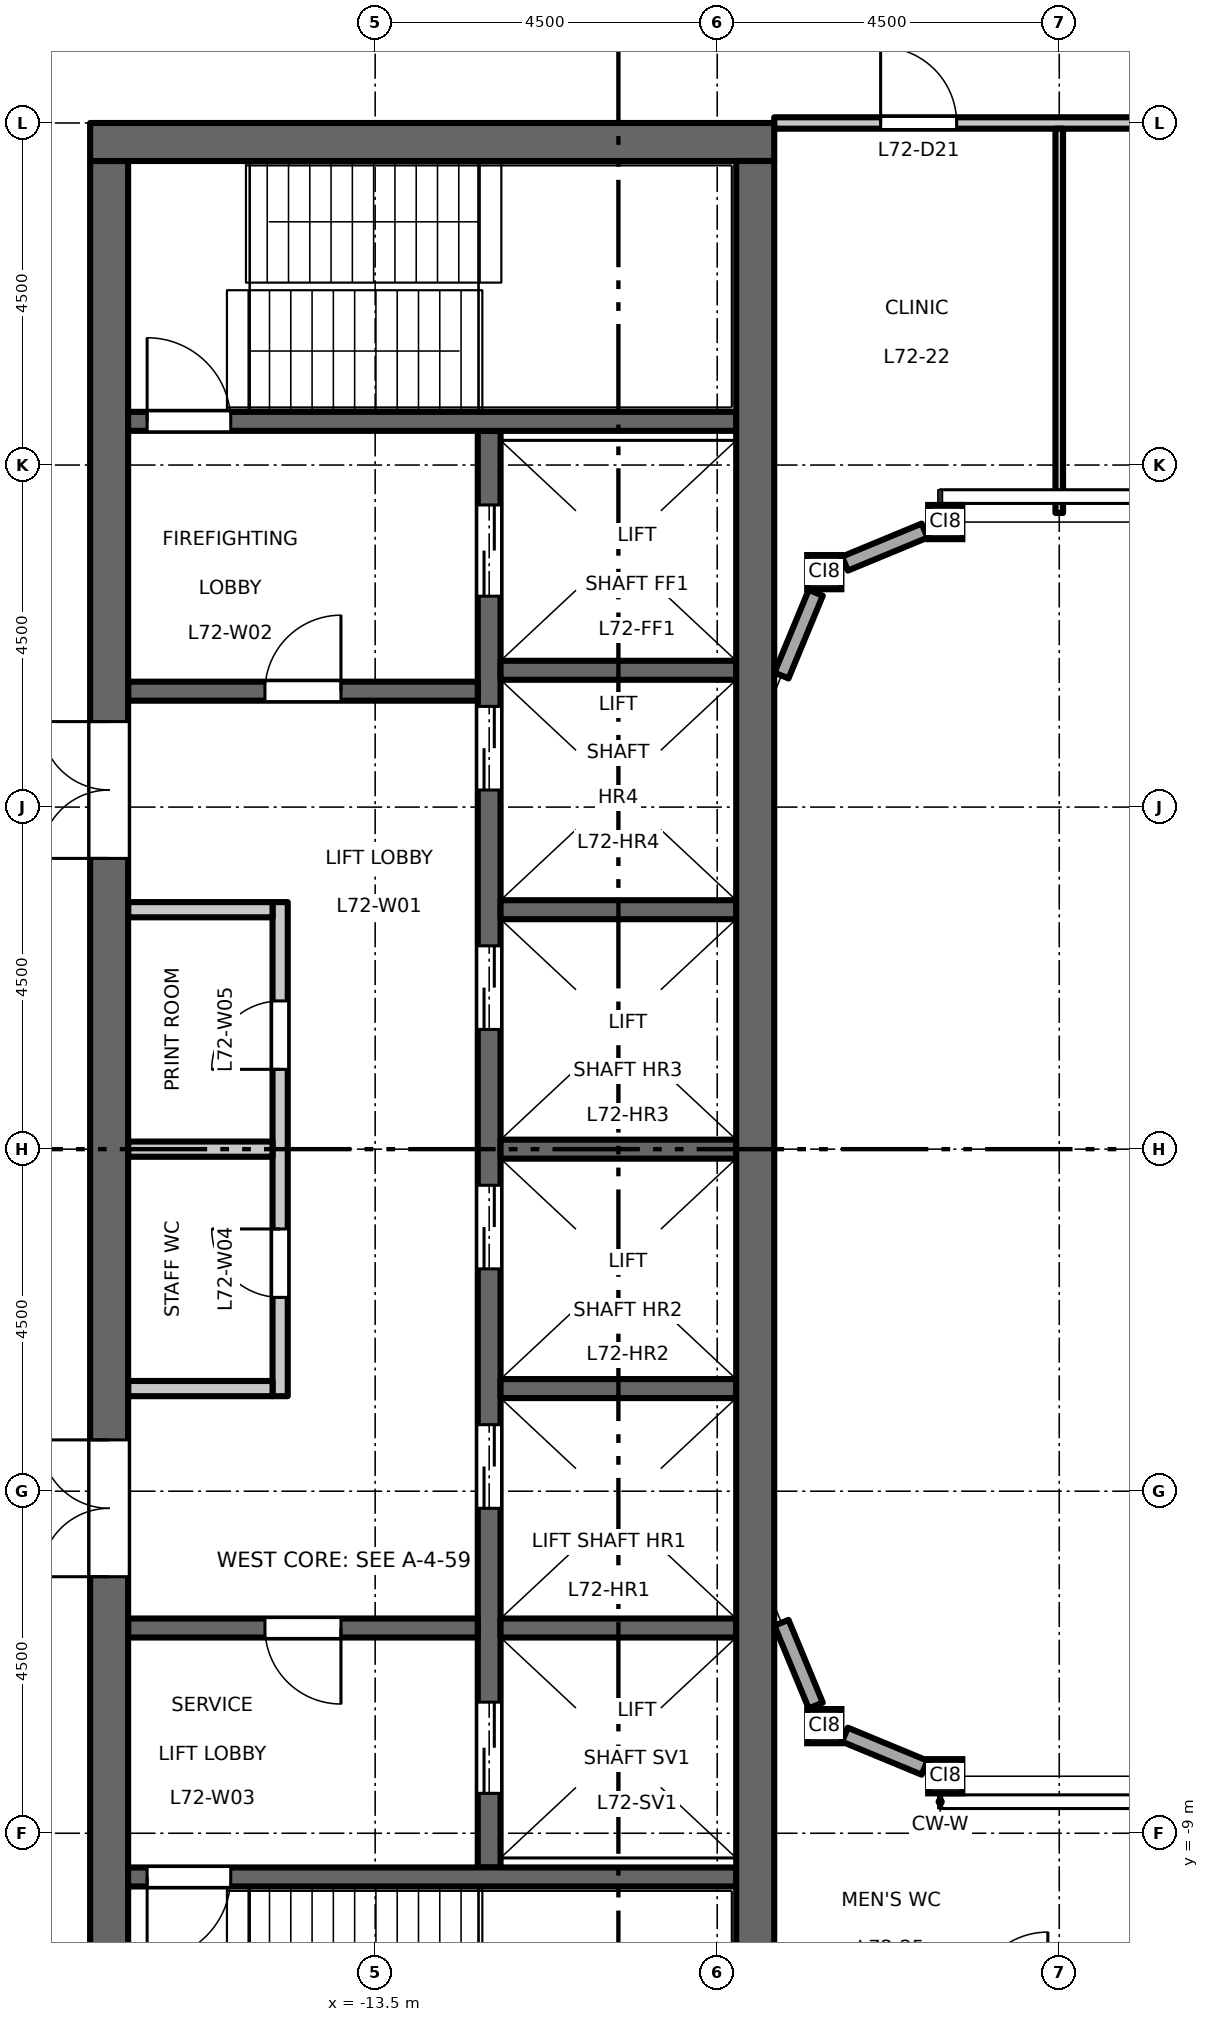
"""IFC4 building model, lengths in metres.
Left out: names, types, materials, properties, quantities, classifications, styles, units other than length and angle.
Written with IfcOpenShell. Run it as: python <this file> out.ifc"""

import sys

from ifc_helpers import new_model, si_unit, direction, frame, frame_2d, origin, origin_2d, place, context, subcontext, project, spatial, rectangle, hollow_rectangle, extrude, element, fill, save


model = new_model("IFC4")
c1 = context("Model", 3, precision=1e-05, world=origin(), true_north=direction((0.0, 1.0)))
c2 = subcontext(c1, "Body", "Model", "MODEL_VIEW")
j1 = project(units=[si_unit("LENGTHUNIT", "METRE"), si_unit("PLANEANGLEUNIT", "RADIAN")], contexts=[c1])
p1 = place(None, origin())
s1 = spatial("IfcSite", under=j1, at=p1, CompositionType="ELEMENT")
p2 = place(p1, origin())
s2 = spatial("IfcBuilding", under=s1, at=p2, CompositionType="ELEMENT")
p3 = place(p2, frame((0.0, 0.0, 334.7)))
s3 = spatial("IfcBuildingStorey", under=s2, at=p3, CompositionType="ELEMENT", Elevation=334.7)
for number, where, z_axis, x_axis in (
    (1, (-7.591, -7.591, 0.0), (0.0, 0.0, 1.0), (1.0, 0.0, 0.0)),
    (2, (-6.0, -8.25, 0.0), (0.0, 0.0, 1.0), (1.0, 0.0, 0.0)),
    (3, (-7.591, 7.591, 0.0), (0.0, 0.0, 1.0), (1.0, 0.0, 0.0)),
    (4, (-6.0, 8.25, 0.0), (0.0, 0.0, 1.0), (1.0, 0.0, 0.0)),
):
    element("IfcColumn", number, at=place(p3, frame(where, z_axis=z_axis, x_axis=x_axis)), inside=s3, PredefinedType="COLUMN", context=c2, shape_type="SweptSolid", body=[
        extrude(hollow_rectangle(XDim=0.45, YDim=0.45, WallThickness=0.022, at=origin_2d()), origin(), (0.0, 0.0, 1.0), 4.5),
    ])
p4 = place(p3, frame((-14.75, -3.25, 0.0), z_axis=(0.0, 0.0, 1.0), x_axis=(0.0, 1.0, 0.0)))
e5 = element("IfcWall", 5, at=p4, inside=s3, PredefinedType="PARTITIONING", context=c2, shape_type="SweptSolid", body=[
    extrude(rectangle(XDim=6.5, YDim=0.2, at=frame_2d((3.25, 0.0))), origin(), (0.0, 0.0, 1.0), 4.35),
])
p5 = place(p4, frame((1.3, 0.0, 0.0)))
e6 = element("IfcOpeningElement", 6, at=p5, cuts=e5, PredefinedType="OPENING", context=c2, shape_type="SweptSolid", body=[
    extrude(rectangle(XDim=0.9, YDim=2.1, at=frame_2d((0.45, 1.05))), frame((0.0, 0.11, 0.0), z_axis=(0.0, -1.0, 0.0), x_axis=(1.0, 0.0, 0.0)), (0.0, 0.0, 1.0), 0.22),
])
p6 = place(p4, frame((4.3, 0.0, 0.0)))
e7 = element("IfcOpeningElement", 7, at=p6, cuts=e5, PredefinedType="OPENING", context=c2, shape_type="SweptSolid", body=[
    extrude(rectangle(XDim=0.9, YDim=2.1, at=frame_2d((0.45, 1.05))), frame((0.0, 0.11, 0.0), z_axis=(0.0, -1.0, 0.0), x_axis=(1.0, 0.0, 0.0)), (0.0, 0.0, 1.0), 0.22),
])
for number, where, z_axis, x_axis in (
    (8, (-14.85, 3.15, 0.0), (0.0, 0.0, 1.0), (-1.0, 0.0, 0.0)),
    (9, (-14.85, -3.15, 0.0), (0.0, 0.0, 1.0), (-1.0, 0.0, 0.0)),
    (10, (-14.85, 0.0, 0.0), (0.0, 0.0, 1.0), (-1.0, 0.0, 0.0)),
):
    element("IfcWall", number, at=place(p3, frame(where, z_axis=z_axis, x_axis=x_axis)), inside=s3, PredefinedType="PARTITIONING", context=c2, shape_type="SweptSolid", body=[
        extrude(rectangle(XDim=1.9, YDim=0.2, at=frame_2d((0.95, 0.0))), origin(), (0.0, 0.0, 1.0), 4.35),
    ])
p7 = place(p3, frame((-12.0, -9.45, 0.0), z_axis=(0.0, 0.0, 1.0), x_axis=(0.0, 1.0, 0.0)))
e11 = element("IfcWall", 11, at=p7, inside=s3, PredefinedType="SHEAR", context=c2, shape_type="SweptSolid", body=[
    extrude(rectangle(XDim=18.9, YDim=0.3, at=frame_2d((9.45, 0.0))), origin(), (0.0, 0.0, 1.0), 4.35),
])
p8 = place(p7, frame((4.725, 0.0, 0.0)))
e12 = element("IfcOpeningElement", 12, at=p8, cuts=e11, PredefinedType="OPENING", context=c2, shape_type="SweptSolid", body=[
    extrude(rectangle(XDim=1.1, YDim=2.1, at=frame_2d((0.55, 1.05))), frame((0.0, 0.16, 0.0), z_axis=(0.0, -1.0, 0.0), x_axis=(1.0, 0.0, 0.0)), (0.0, 0.0, 1.0), 0.32),
])
p9 = place(p7, frame((7.875, 0.0, 0.0)))
e13 = element("IfcOpeningElement", 13, at=p9, cuts=e11, PredefinedType="OPENING", context=c2, shape_type="SweptSolid", body=[
    extrude(rectangle(XDim=1.1, YDim=2.1, at=frame_2d((0.55, 1.05))), frame((0.0, 0.16, 0.0), z_axis=(0.0, -1.0, 0.0), x_axis=(1.0, 0.0, 0.0)), (0.0, 0.0, 1.0), 0.32),
])
p10 = place(p7, frame((11.025, 0.0, 0.0)))
e14 = element("IfcOpeningElement", 14, at=p10, cuts=e11, PredefinedType="OPENING", context=c2, shape_type="SweptSolid", body=[
    extrude(rectangle(XDim=1.1, YDim=2.1, at=frame_2d((0.55, 1.05))), frame((0.0, 0.16, 0.0), z_axis=(0.0, -1.0, 0.0), x_axis=(1.0, 0.0, 0.0)), (0.0, 0.0, 1.0), 0.32),
])
p11 = place(p7, frame((14.175, 0.0, 0.0)))
e15 = element("IfcOpeningElement", 15, at=p11, cuts=e11, PredefinedType="OPENING", context=c2, shape_type="SweptSolid", body=[
    extrude(rectangle(XDim=1.1, YDim=2.1, at=frame_2d((0.55, 1.05))), frame((0.0, 0.16, 0.0), z_axis=(0.0, -1.0, 0.0), x_axis=(1.0, 0.0, 0.0)), (0.0, 0.0, 1.0), 0.32),
])
p12 = place(p7, frame((16.725, 0.0, 0.0)))
e16 = element("IfcOpeningElement", 16, at=p12, cuts=e11, PredefinedType="OPENING", context=c2, shape_type="SweptSolid", body=[
    extrude(rectangle(XDim=1.2, YDim=2.1, at=frame_2d((0.6, 1.05))), frame((0.0, 0.16, 0.0), z_axis=(0.0, -1.0, 0.0), x_axis=(1.0, 0.0, 0.0)), (0.0, 0.0, 1.0), 0.32),
])
p13 = place(p7, frame((0.975, 0.0, 0.0)))
e17 = element("IfcOpeningElement", 17, at=p13, cuts=e11, PredefinedType="OPENING", context=c2, shape_type="SweptSolid", body=[
    extrude(rectangle(XDim=1.2, YDim=2.1, at=frame_2d((0.6, 1.05))), frame((0.0, 0.16, 0.0), z_axis=(0.0, -1.0, 0.0), x_axis=(1.0, 0.0, 0.0)), (0.0, 0.0, 1.0), 0.32),
])
p14 = place(p3, frame((-12.15, 6.025, 0.0), z_axis=(0.0, 0.0, 1.0), x_axis=(-1.0, 0.0, 0.0)))
e18 = element("IfcWall", 18, at=p14, inside=s3, PredefinedType="SHEAR", context=c2, shape_type="SweptSolid", body=[
    extrude(rectangle(XDim=4.6, YDim=0.25, at=frame_2d((2.3, 0.0))), origin(), (0.0, 0.0, 1.0), 4.35),
])
p15 = place(p14, frame((1.8, 0.0, 0.0)))
e19 = element("IfcOpeningElement", 19, at=p15, cuts=e18, PredefinedType="OPENING", context=c2, shape_type="SweptSolid", body=[
    extrude(rectangle(XDim=1.0, YDim=2.1, at=frame_2d((0.5, 1.05))), frame((0.0, 0.135, 0.0), z_axis=(0.0, -1.0, 0.0), x_axis=(1.0, 0.0, 0.0)), (0.0, 0.0, 1.0), 0.27),
])
p16 = place(p3, frame((-12.15, -6.3, 0.0), z_axis=(0.0, 0.0, 1.0), x_axis=(-1.0, 0.0, 0.0)))
e20 = element("IfcWall", 20, at=p16, inside=s3, PredefinedType="SHEAR", context=c2, shape_type="SweptSolid", body=[
    extrude(rectangle(XDim=4.6, YDim=0.25, at=frame_2d((2.3, 0.0))), origin(), (0.0, 0.0, 1.0), 4.35),
])
p17 = place(p16, frame((1.8, 0.0, 0.0)))
e21 = element("IfcOpeningElement", 21, at=p17, cuts=e20, PredefinedType="OPENING", context=c2, shape_type="SweptSolid", body=[
    extrude(rectangle(XDim=1.0, YDim=2.1, at=frame_2d((0.5, 1.05))), frame((0.0, 0.135, 0.0), z_axis=(0.0, -1.0, 0.0), x_axis=(1.0, 0.0, 0.0)), (0.0, 0.0, 1.0), 0.27),
])
p18 = place(p3, frame((-17.0, -13.0, 0.0), z_axis=(0.0, 0.0, 1.0), x_axis=(0.0, 1.0, 0.0)))
e22 = element("IfcWall", 22, at=p18, inside=s3, PredefinedType="SHEAR", context=c2, shape_type="SweptSolid", body=[
    extrude(rectangle(XDim=26.0, YDim=0.5, at=frame_2d((13.0, 0.0))), origin(), (0.0, 0.0, 1.0), 4.35),
])
p19 = place(p18, frame((16.825, 0.0, 0.0)))
e23 = element("IfcOpeningElement", 23, at=p19, cuts=e22, PredefinedType="OPENING", context=c2, shape_type="SweptSolid", body=[
    extrude(rectangle(XDim=1.8, YDim=2.1, at=frame_2d((0.9, 1.05))), frame((0.0, 0.26, 0.0), z_axis=(0.0, -1.0, 0.0), x_axis=(1.0, 0.0, 0.0)), (0.0, 0.0, 1.0), 0.52),
])
p20 = place(p18, frame((7.375, 0.0, 0.0)))
e24 = element("IfcOpeningElement", 24, at=p20, cuts=e22, PredefinedType="OPENING", context=c2, shape_type="SweptSolid", body=[
    extrude(rectangle(XDim=1.8, YDim=2.1, at=frame_2d((0.9, 1.05))), frame((0.0, 0.26, 0.0), z_axis=(0.0, -1.0, 0.0), x_axis=(1.0, 0.0, 0.0)), (0.0, 0.0, 1.0), 0.52),
])
for number, where, z_axis, x_axis in (
    (25, (-8.75, 0.0, 0.0), (0.0, 0.0, 1.0), (-1.0, 0.0, 0.0)),
    (26, (-8.75, 3.15, 0.0), (0.0, 0.0, 1.0), (-1.0, 0.0, 0.0)),
    (27, (-8.75, 6.3, 0.0), (0.0, 0.0, 1.0), (-1.0, 0.0, 0.0)),
    (28, (-8.75, -3.15, 0.0), (0.0, 0.0, 1.0), (-1.0, 0.0, 0.0)),
    (29, (-8.75, -6.3, 0.0), (0.0, 0.0, 1.0), (-1.0, 0.0, 0.0)),
):
    element("IfcWall", number, at=place(p3, frame(where, z_axis=z_axis, x_axis=x_axis)), inside=s3, PredefinedType="SHEAR", context=c2, shape_type="SweptSolid", body=[
        extrude(rectangle(XDim=3.1, YDim=0.25, at=frame_2d((1.55, 0.0))), origin(), (0.0, 0.0, 1.0), 4.35),
    ])
p21 = place(p3, frame((-8.75, 9.575, 0.0), z_axis=(0.0, 0.0, 1.0), x_axis=(-1.0, 0.0, 0.0)))
e30 = element("IfcWall", 30, at=p21, inside=s3, PredefinedType="SHEAR", context=c2, shape_type="SweptSolid", body=[
    extrude(rectangle(XDim=8.0, YDim=0.25, at=frame_2d((4.0, 0.0))), origin(), (0.0, 0.0, 1.0), 4.35),
])
p22 = place(p21, frame((6.65, 0.0, 0.0)))
e31 = element("IfcOpeningElement", 31, at=p22, cuts=e30, PredefinedType="OPENING", context=c2, shape_type="SweptSolid", body=[
    extrude(rectangle(XDim=1.1, YDim=2.1, at=frame_2d((0.55, 1.05))), frame((0.0, 0.135, 0.0), z_axis=(0.0, -1.0, 0.0), x_axis=(1.0, 0.0, 0.0)), (0.0, 0.0, 1.0), 0.27),
])
p23 = place(p3, frame((-8.75, -9.575, 0.0), z_axis=(0.0, 0.0, 1.0), x_axis=(-1.0, 0.0, 0.0)))
e32 = element("IfcWall", 32, at=p23, inside=s3, PredefinedType="SHEAR", context=c2, shape_type="SweptSolid", body=[
    extrude(rectangle(XDim=8.0, YDim=0.25, at=frame_2d((4.0, 0.0))), origin(), (0.0, 0.0, 1.0), 4.35),
])
p24 = place(p23, frame((6.65, 0.0, 0.0)))
e33 = element("IfcOpeningElement", 33, at=p24, cuts=e32, PredefinedType="OPENING", context=c2, shape_type="SweptSolid", body=[
    extrude(rectangle(XDim=1.1, YDim=2.1, at=frame_2d((0.55, 1.05))), frame((0.0, 0.135, 0.0), z_axis=(0.0, -1.0, 0.0), x_axis=(1.0, 0.0, 0.0)), (0.0, 0.0, 1.0), 0.27),
])
p25 = place(p3, frame((-8.25, 13.25, 0.0), z_axis=(0.0, 0.0, 1.0), x_axis=(-1.0, 0.0, 0.0)))
e34 = element("IfcWall", 34, at=p25, inside=s3, PredefinedType="SHEAR", context=c2, shape_type="SweptSolid", body=[
    extrude(rectangle(XDim=9.0, YDim=0.5, at=frame_2d((4.5, 0.0))), origin(), (0.0, 0.0, 1.0), 4.35),
])
p26 = place(p3, frame((-8.5, -13.0, 0.0), z_axis=(0.0, 0.0, 1.0), x_axis=(0.0, 1.0, 0.0)))
e35 = element("IfcWall", 35, at=p26, inside=s3, PredefinedType="SHEAR", context=c2, shape_type="SweptSolid", body=[
    extrude(rectangle(XDim=26.0, YDim=0.5, at=frame_2d((13.0, 0.0))), origin(), (0.0, 0.0, 1.0), 4.35),
])
p27 = place(p3, frame((-6.271, 8.137, 0.0), z_axis=(0.0, 0.0, 1.0), x_axis=(-0.923864661962, -0.382719331074, 0.0)))
e36 = element("IfcWall", 36, at=p27, inside=s3, PredefinedType="STANDARD", context=c2, shape_type="SweptSolid", body=[
    extrude(rectangle(XDim=1.134, YDim=0.2, at=frame_2d((0.567, 0.0))), origin(), (0.0, 0.0, 1.0), 4.01),
])
for number, where, z_axis, x_axis in (
    (37, (-7.703, 7.319, 0.0), (0.0, 0.0, 1.0), (-0.383, -0.924, 0.0)),
    (38, (-8.154, -6.231, 0.0), (0.0, 0.0, 1.0), (0.383, -0.924, 0.0)),
):
    element("IfcWall", number, at=place(p3, frame(where, z_axis=z_axis, x_axis=x_axis)), inside=s3, PredefinedType="STANDARD", context=c2, shape_type="SweptSolid", body=[
        extrude(rectangle(XDim=1.178, YDim=0.2, at=frame_2d((0.589, 0.0))), origin(), (0.0, 0.0, 1.0), 4.01),
    ])
p28 = place(p3, frame((-7.319, -7.703, 0.0), z_axis=(0.0, 0.0, 1.0), x_axis=(0.923864661962, -0.382719331074, 0.0)))
e39 = element("IfcWall", 39, at=p28, inside=s3, PredefinedType="STANDARD", context=c2, shape_type="SweptSolid", body=[
    extrude(rectangle(XDim=1.134, YDim=0.2, at=frame_2d((0.567, 0.0))), origin(), (0.0, 0.0, 1.0), 4.01),
])
p29 = place(p3, frame((-8.25, 13.5, 0.0), z_axis=(0.0, 0.0, 1.0), x_axis=(1.0, 0.0, 0.0)))
e40 = element("IfcWall", 40, at=p29, inside=s3, PredefinedType="PARTITIONING", context=c2, shape_type="SweptSolid", body=[
    extrude(rectangle(XDim=16.5, YDim=0.15, at=frame_2d((8.25, 0.0))), origin(), (0.0, 0.0, 1.0), 4.35),
])
p30 = place(p29, frame((1.4, 0.0, 0.0)))
e41 = element("IfcOpeningElement", 41, at=p30, cuts=e40, PredefinedType="OPENING", context=c2, shape_type="SweptSolid", body=[
    extrude(rectangle(XDim=1.0, YDim=2.1, at=frame_2d((0.5, 1.05))), frame((0.0, 0.085, 0.0), z_axis=(0.0, -1.0, 0.0), x_axis=(1.0, 0.0, 0.0)), (0.0, 0.0, 1.0), 0.17),
])
p31 = place(p29, frame((9.65, 0.0, 0.0)))
e42 = element("IfcOpeningElement", 42, at=p31, cuts=e40, PredefinedType="OPENING", context=c2, shape_type="SweptSolid", body=[
    extrude(rectangle(XDim=1.0, YDim=2.1, at=frame_2d((0.5, 1.05))), frame((0.0, 0.085, 0.0), z_axis=(0.0, -1.0, 0.0), x_axis=(1.0, 0.0, 0.0)), (0.0, 0.0, 1.0), 0.17),
])
p32 = place(p3, frame((-4.5, 8.37, 0.0), z_axis=(0.0, 0.0, 1.0), x_axis=(0.0, 1.0, 0.0)))
e43 = element("IfcWall", 43, at=p32, inside=s3, PredefinedType="PARTITIONING", context=c2, shape_type="SweptSolid", body=[
    extrude(rectangle(XDim=5.055, YDim=0.1, at=frame_2d((2.527, 0.0))), origin(), (0.0, 0.0, 1.0), 3.65),
])
p33 = place(p15, origin())
e44 = element("IfcDoor", 44, at=p33, inside=s3, OperationType="SINGLE_SWING_LEFT", PredefinedType="DOOR", context=c2, shape_type="SweptSolid", body=[
    extrude(rectangle(XDim=1.0, YDim=2.1, at=frame_2d((0.5, 1.05))), frame((0.0, 0.025, 0.0), z_axis=(0.0, -1.0, 0.0), x_axis=(1.0, 0.0, 0.0)), (0.0, 0.0, 1.0), 0.05),
])
fill(e19, e44)
p34 = place(p17, origin())
e45 = element("IfcDoor", 45, at=p34, inside=s3, OperationType="SINGLE_SWING_RIGHT", PredefinedType="DOOR", context=c2, shape_type="SweptSolid", body=[
    extrude(rectangle(XDim=1.0, YDim=2.1, at=frame_2d((0.5, 1.05))), frame((0.0, 0.025, 0.0), z_axis=(0.0, -1.0, 0.0), x_axis=(1.0, 0.0, 0.0)), (0.0, 0.0, 1.0), 0.05),
])
fill(e21, e45)
p35 = place(p22, origin())
e46 = element("IfcDoor", 46, at=p35, inside=s3, OperationType="SINGLE_SWING_RIGHT", PredefinedType="DOOR", context=c2, shape_type="SweptSolid", body=[
    extrude(rectangle(XDim=1.1, YDim=2.1, at=frame_2d((0.55, 1.05))), frame((0.0, 0.025, 0.0), z_axis=(0.0, -1.0, 0.0), x_axis=(1.0, 0.0, 0.0)), (0.0, 0.0, 1.0), 0.05),
])
fill(e31, e46)
p36 = place(p24, origin())
e47 = element("IfcDoor", 47, at=p36, inside=s3, OperationType="SINGLE_SWING_LEFT", PredefinedType="DOOR", context=c2, shape_type="SweptSolid", body=[
    extrude(rectangle(XDim=1.1, YDim=2.1, at=frame_2d((0.55, 1.05))), frame((0.0, 0.025, 0.0), z_axis=(0.0, -1.0, 0.0), x_axis=(1.0, 0.0, 0.0)), (0.0, 0.0, 1.0), 0.05),
])
fill(e33, e47)
p37 = place(p19, origin())
e48 = element("IfcDoor", 48, at=p37, inside=s3, OperationType="DOUBLE_DOOR_DOUBLE_SWING", PredefinedType="DOOR", context=c2, shape_type="SweptSolid", body=[
    extrude(rectangle(XDim=1.8, YDim=2.1, at=frame_2d((0.9, 1.05))), frame((0.0, 0.025, 0.0), z_axis=(0.0, -1.0, 0.0), x_axis=(1.0, 0.0, 0.0)), (0.0, 0.0, 1.0), 0.05),
])
fill(e23, e48)
p38 = place(p20, origin())
e49 = element("IfcDoor", 49, at=p38, inside=s3, OperationType="DOUBLE_DOOR_DOUBLE_SWING", PredefinedType="DOOR", context=c2, shape_type="SweptSolid", body=[
    extrude(rectangle(XDim=1.8, YDim=2.1, at=frame_2d((0.9, 1.05))), frame((0.0, 0.025, 0.0), z_axis=(0.0, -1.0, 0.0), x_axis=(1.0, 0.0, 0.0)), (0.0, 0.0, 1.0), 0.05),
])
fill(e24, e49)
p39 = place(p8, origin())
e50 = element("IfcDoor", 50, at=p39, inside=s3, OperationType="DOUBLE_DOOR_SLIDING", PredefinedType="DOOR", context=c2, shape_type="SweptSolid", body=[
    extrude(rectangle(XDim=1.1, YDim=2.1, at=frame_2d((0.55, 1.05))), frame((0.0, 0.025, 0.0), z_axis=(0.0, -1.0, 0.0), x_axis=(1.0, 0.0, 0.0)), (0.0, 0.0, 1.0), 0.05),
])
fill(e12, e50)
p40 = place(p9, origin())
e51 = element("IfcDoor", 51, at=p40, inside=s3, OperationType="DOUBLE_DOOR_SLIDING", PredefinedType="DOOR", context=c2, shape_type="SweptSolid", body=[
    extrude(rectangle(XDim=1.1, YDim=2.1, at=frame_2d((0.55, 1.05))), frame((0.0, 0.025, 0.0), z_axis=(0.0, -1.0, 0.0), x_axis=(1.0, 0.0, 0.0)), (0.0, 0.0, 1.0), 0.05),
])
fill(e13, e51)
p41 = place(p10, origin())
e52 = element("IfcDoor", 52, at=p41, inside=s3, OperationType="DOUBLE_DOOR_SLIDING", PredefinedType="DOOR", context=c2, shape_type="SweptSolid", body=[
    extrude(rectangle(XDim=1.1, YDim=2.1, at=frame_2d((0.55, 1.05))), frame((0.0, 0.025, 0.0), z_axis=(0.0, -1.0, 0.0), x_axis=(1.0, 0.0, 0.0)), (0.0, 0.0, 1.0), 0.05),
])
fill(e14, e52)
p42 = place(p11, origin())
e53 = element("IfcDoor", 53, at=p42, inside=s3, OperationType="DOUBLE_DOOR_SLIDING", PredefinedType="DOOR", context=c2, shape_type="SweptSolid", body=[
    extrude(rectangle(XDim=1.1, YDim=2.1, at=frame_2d((0.55, 1.05))), frame((0.0, 0.025, 0.0), z_axis=(0.0, -1.0, 0.0), x_axis=(1.0, 0.0, 0.0)), (0.0, 0.0, 1.0), 0.05),
])
fill(e15, e53)
p43 = place(p12, origin())
e54 = element("IfcDoor", 54, at=p43, inside=s3, OperationType="DOUBLE_DOOR_SLIDING", PredefinedType="DOOR", context=c2, shape_type="SweptSolid", body=[
    extrude(rectangle(XDim=1.2, YDim=2.1, at=frame_2d((0.6, 1.05))), frame((0.0, 0.025, 0.0), z_axis=(0.0, -1.0, 0.0), x_axis=(1.0, 0.0, 0.0)), (0.0, 0.0, 1.0), 0.05),
])
fill(e16, e54)
p44 = place(p13, origin())
e55 = element("IfcDoor", 55, at=p44, inside=s3, OperationType="DOUBLE_DOOR_SLIDING", PredefinedType="DOOR", context=c2, shape_type="SweptSolid", body=[
    extrude(rectangle(XDim=1.2, YDim=2.1, at=frame_2d((0.6, 1.05))), frame((0.0, 0.025, 0.0), z_axis=(0.0, -1.0, 0.0), x_axis=(1.0, 0.0, 0.0)), (0.0, 0.0, 1.0), 0.05),
])
fill(e17, e55)
p45 = place(p5, origin())
e56 = element("IfcDoor", 56, at=p45, inside=s3, OperationType="SINGLE_SWING_LEFT", PredefinedType="DOOR", context=c2, shape_type="SweptSolid", body=[
    extrude(rectangle(XDim=0.9, YDim=2.1, at=frame_2d((0.45, 1.05))), frame((0.0, 0.025, 0.0), z_axis=(0.0, -1.0, 0.0), x_axis=(1.0, 0.0, 0.0)), (0.0, 0.0, 1.0), 0.05),
])
fill(e6, e56)
p46 = place(p6, origin())
e57 = element("IfcDoor", 57, at=p46, inside=s3, OperationType="SINGLE_SWING_RIGHT", PredefinedType="DOOR", context=c2, shape_type="SweptSolid", body=[
    extrude(rectangle(XDim=0.9, YDim=2.1, at=frame_2d((0.45, 1.05))), frame((0.0, 0.025, 0.0), z_axis=(0.0, -1.0, 0.0), x_axis=(1.0, 0.0, 0.0)), (0.0, 0.0, 1.0), 0.05),
])
fill(e7, e57)
p47 = place(p30, origin())
e58 = element("IfcDoor", 58, at=p47, inside=s3, OperationType="SINGLE_SWING_LEFT", PredefinedType="DOOR", context=c2, shape_type="SweptSolid", body=[
    extrude(rectangle(XDim=1.0, YDim=2.1, at=frame_2d((0.5, 1.05))), frame((0.0, 0.025, 0.0), z_axis=(0.0, -1.0, 0.0), x_axis=(1.0, 0.0, 0.0)), (0.0, 0.0, 1.0), 0.05),
])
fill(e41, e58)
save(model, sys.argv[1])
